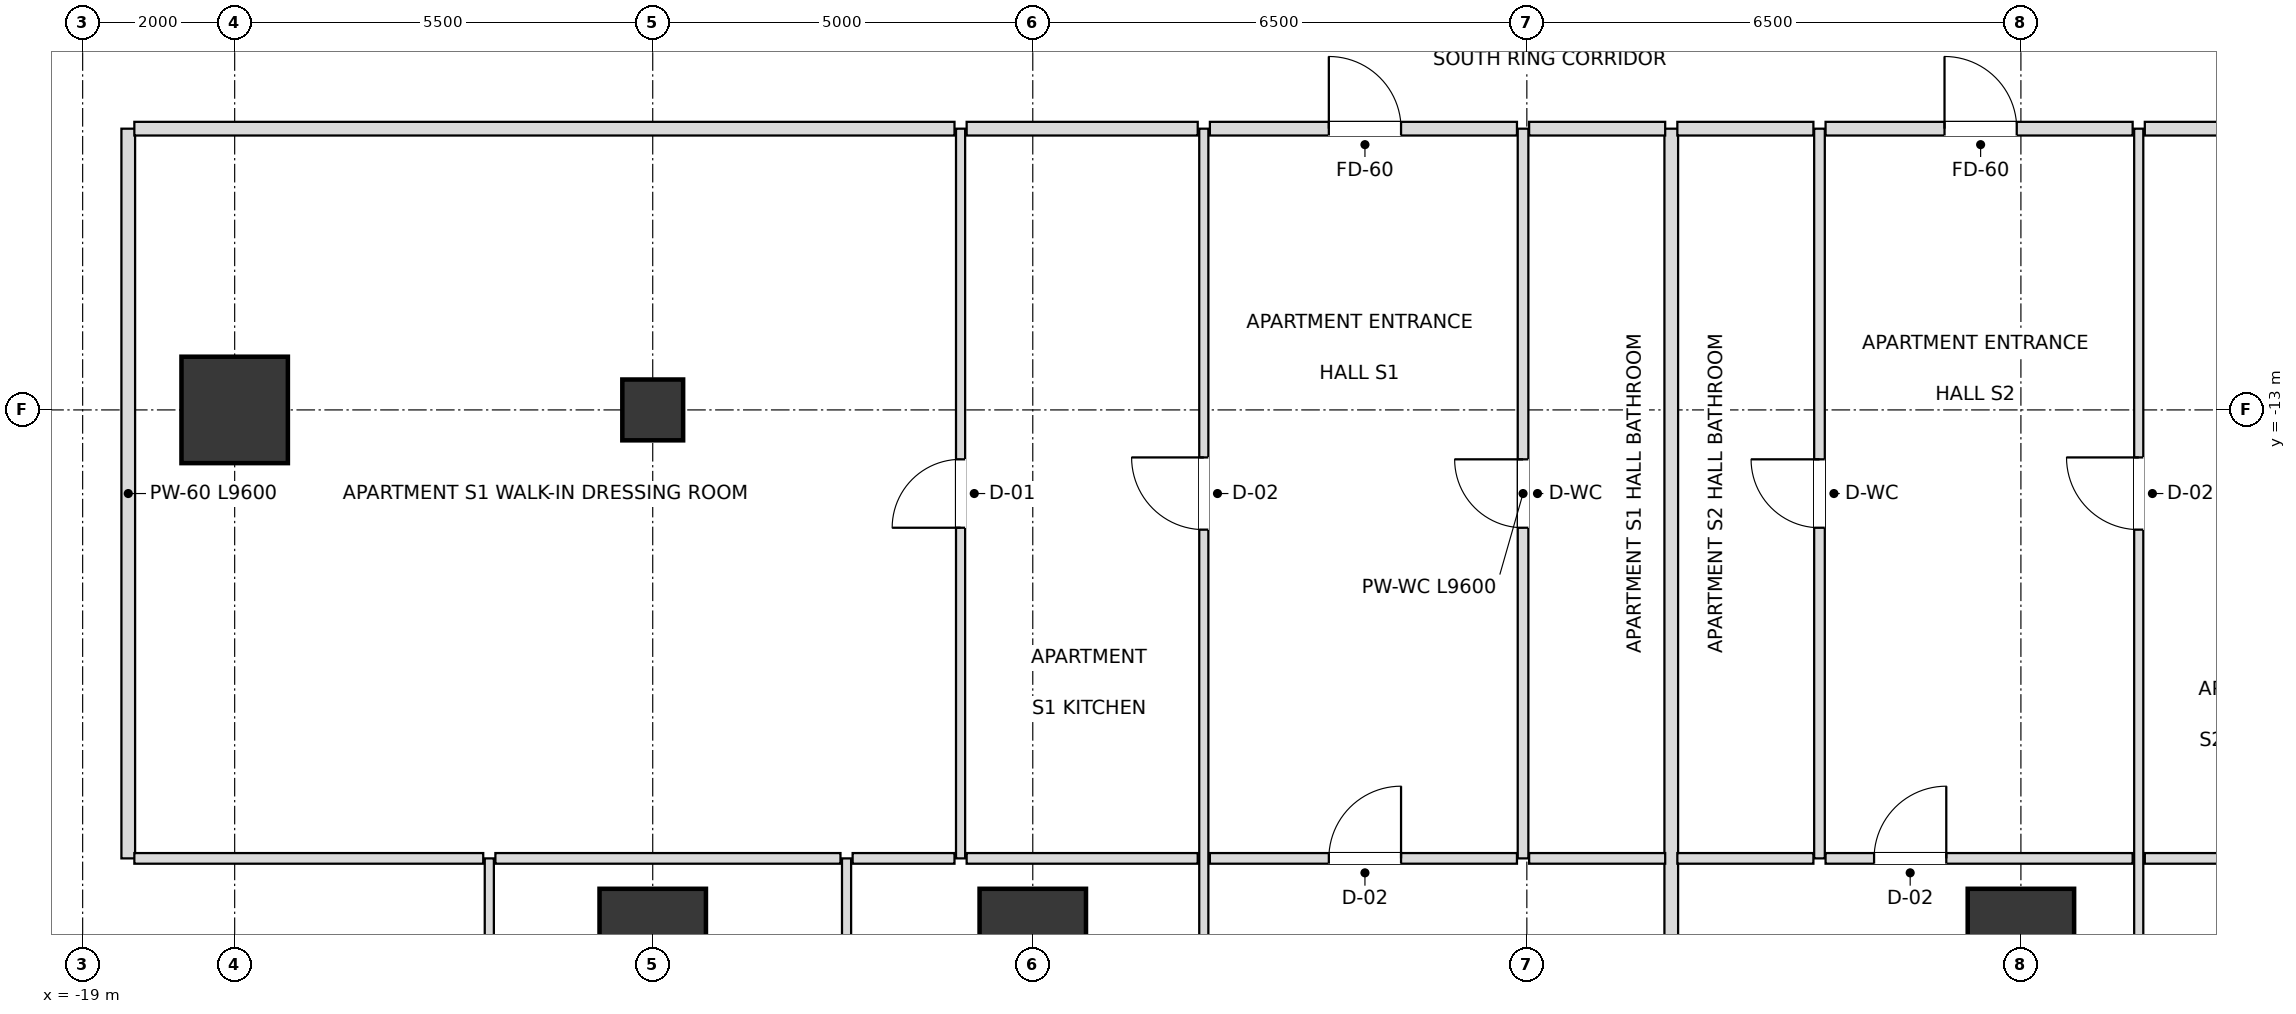
"""IFC4 building model, lengths in metres.
Left out: names, types, materials, properties, quantities, classifications, styles, units other than length and angle.
Written with IfcOpenShell. Run it as: python <this file> out.ifc"""

import sys

from ifc_helpers import new_model, si_unit, direction, frame, frame_2d, origin, origin_2d, place, context, subcontext, project, spatial, rectangle, extrude, element, fill, save


model = new_model("IFC4")
c1 = context("Model", 3, precision=1e-05, world=origin(), true_north=direction((0.0, 1.0)))
c2 = subcontext(c1, "Body", "Model", "MODEL_VIEW")
j1 = project(units=[si_unit("LENGTHUNIT", "METRE"), si_unit("PLANEANGLEUNIT", "RADIAN")], contexts=[c1])
p1 = place(None, origin())
s1 = spatial("IfcSite", under=j1, at=p1, CompositionType="ELEMENT")
p2 = place(p1, origin())
s2 = spatial("IfcBuilding", under=s1, at=p2, CompositionType="ELEMENT")
p3 = place(p2, frame((0.0, 0.0, 36.0)))
s3 = spatial("IfcBuildingStorey", under=s2, at=p3, CompositionType="ELEMENT", Elevation=36.0)
for number, where, z_axis, x_axis in (
    (1, (-11.5, -20.0, 0.0), (0.0, 0.0, 1.0), (1.0, 0.0, 0.0)),
    (2, (-6.5, -20.0, 0.0), (0.0, 0.0, 1.0), (1.0, 0.0, 0.0)),
    (3, (6.5, -20.0, 0.0), (0.0, 0.0, 1.0), (1.0, 0.0, 0.0)),
    (4, (-17.0, -13.0, 0.0), (0.0, 0.0, 1.0), (1.0, 0.0, 0.0)),
):
    element("IfcColumn", number, at=place(p3, frame(where, z_axis=z_axis, x_axis=x_axis)), inside=s3, PredefinedType="USERDEFINED", context=c2, shape_type="SweptSolid", body=[
        extrude(rectangle(XDim=1.4, YDim=1.4, at=origin_2d()), origin(), (0.0, 0.0, 1.0), 3.6),
    ])
p4 = place(p3, frame((-11.5, -13.0, 0.0), z_axis=(0.0, 0.0, 1.0), x_axis=(1.0, 0.0, 0.0)))
e5 = element("IfcColumn", 5, at=p4, inside=s3, PredefinedType="COLUMN", context=c2, shape_type="SweptSolid", body=[
    extrude(rectangle(XDim=0.8, YDim=0.8, at=origin_2d()), origin(), (0.0, 0.0, 1.0), 3.6),
])
p5 = place(p3, frame((-18.4, -18.9, 0.0), z_axis=(0.0, 0.0, 1.0), x_axis=(0.0, 1.0, 0.0)))
e6 = element("IfcWall", 6, at=p5, inside=s3, PredefinedType="PARTITIONING", context=c2, shape_type="SweptSolid", body=[
    extrude(rectangle(XDim=9.6, YDim=0.18, at=frame_2d((4.8, 0.0))), origin(), (0.0, 0.0, 1.0), 2.736),
])
p6 = place(p3, frame((-13.65, -24.9, 0.0), z_axis=(0.0, 0.0, 1.0), x_axis=(0.0, 1.0, 0.0)))
e7 = element("IfcWall", 7, at=p6, inside=s3, PredefinedType="PARTITIONING", context=c2, shape_type="SweptSolid", body=[
    extrude(rectangle(XDim=6.0, YDim=0.12, at=frame_2d((3.0, 0.0))), origin(), (0.0, 0.0, 1.0), 2.736),
])
p7 = place(p6, frame((2.55, 0.0, 0.0)))
e8 = element("IfcOpeningElement", 8, at=p7, cuts=e7, PredefinedType="OPENING", context=c2, shape_type="SweptSolid", body=[
    extrude(rectangle(XDim=0.9, YDim=2.1, at=frame_2d((0.45, 1.05))), frame((0.0, 0.07, 0.0), z_axis=(0.0, -1.0, 0.0), x_axis=(1.0, 0.0, 0.0)), (0.0, 0.0, 1.0), 0.14),
])
p8 = place(p3, frame((-8.95, -24.9, 0.0), z_axis=(0.0, 0.0, 1.0), x_axis=(0.0, 1.0, 0.0)))
e9 = element("IfcWall", 9, at=p8, inside=s3, PredefinedType="PARTITIONING", context=c2, shape_type="SweptSolid", body=[
    extrude(rectangle(XDim=6.0, YDim=0.12, at=frame_2d((3.0, 0.0))), origin(), (0.0, 0.0, 1.0), 2.816),
])
p9 = place(p8, frame((2.55, 0.0, 0.0)))
e10 = element("IfcOpeningElement", 10, at=p9, cuts=e9, PredefinedType="OPENING", context=c2, shape_type="SweptSolid", body=[
    extrude(rectangle(XDim=0.9, YDim=2.1, at=frame_2d((0.45, 1.05))), frame((0.0, 0.07, 0.0), z_axis=(0.0, -1.0, 0.0), x_axis=(1.0, 0.0, 0.0)), (0.0, 0.0, 1.0), 0.14),
])
p10 = place(p3, frame((-7.45, -18.9, 0.0), z_axis=(0.0, 0.0, 1.0), x_axis=(0.0, 1.0, 0.0)))
e11 = element("IfcWall", 11, at=p10, inside=s3, PredefinedType="PARTITIONING", context=c2, shape_type="SweptSolid", body=[
    extrude(rectangle(XDim=9.6, YDim=0.12, at=frame_2d((4.8, 0.0))), origin(), (0.0, 0.0, 1.0), 2.816),
])
p11 = place(p10, frame((4.35, 0.0, 0.0)))
e12 = element("IfcOpeningElement", 12, at=p11, cuts=e11, PredefinedType="OPENING", context=c2, shape_type="SweptSolid", body=[
    extrude(rectangle(XDim=0.9, YDim=2.1, at=frame_2d((0.45, 1.05))), frame((0.0, 0.07, 0.0), z_axis=(0.0, -1.0, 0.0), x_axis=(1.0, 0.0, 0.0)), (0.0, 0.0, 1.0), 0.14),
])
p12 = place(p3, frame((-4.25, -24.9, 0.0), z_axis=(0.0, 0.0, 1.0), x_axis=(0.0, 1.0, 0.0)))
e13 = element("IfcWall", 13, at=p12, inside=s3, PredefinedType="PARTITIONING", context=c2, shape_type="SweptSolid", body=[
    extrude(rectangle(XDim=15.6, YDim=0.12, at=frame_2d((7.8, 0.0))), origin(), (0.0, 0.0, 1.0), 2.816),
])
p13 = place(p12, frame((10.325, 0.0, 0.0)))
e14 = element("IfcOpeningElement", 14, at=p13, cuts=e13, PredefinedType="OPENING", context=c2, shape_type="SweptSolid", body=[
    extrude(rectangle(XDim=0.95, YDim=2.1, at=frame_2d((0.475, 1.05))), frame((0.0, 0.07, 0.0), z_axis=(0.0, -1.0, 0.0), x_axis=(1.0, 0.0, 0.0)), (0.0, 0.0, 1.0), 0.14),
])
p14 = place(p12, frame((2.55, 0.0, 0.0)))
e15 = element("IfcOpeningElement", 15, at=p14, cuts=e13, PredefinedType="OPENING", context=c2, shape_type="SweptSolid", body=[
    extrude(rectangle(XDim=0.9, YDim=2.1, at=frame_2d((0.45, 1.05))), frame((0.0, 0.07, 0.0), z_axis=(0.0, -1.0, 0.0), x_axis=(1.0, 0.0, 0.0)), (0.0, 0.0, 1.0), 0.14),
])
p15 = place(p3, frame((-0.05, -18.9, 0.0), z_axis=(0.0, 0.0, 1.0), x_axis=(0.0, 1.0, 0.0)))
e16 = element("IfcWall", 16, at=p15, inside=s3, PredefinedType="PARTITIONING", context=c2, shape_type="SweptSolid", body=[
    extrude(rectangle(XDim=9.6, YDim=0.14, at=frame_2d((4.8, 0.0))), origin(), (0.0, 0.0, 1.0), 2.948),
])
p16 = place(p15, frame((4.35, 0.0, 0.0)))
e17 = element("IfcOpeningElement", 17, at=p16, cuts=e16, PredefinedType="OPENING", context=c2, shape_type="SweptSolid", body=[
    extrude(rectangle(XDim=0.9, YDim=2.1, at=frame_2d((0.45, 1.05))), frame((0.0, 0.08, 0.0), z_axis=(0.0, -1.0, 0.0), x_axis=(1.0, 0.0, 0.0)), (0.0, 0.0, 1.0), 0.16),
])
p17 = place(p3, frame((1.9, -24.9, 0.0), z_axis=(0.0, 0.0, 1.0), x_axis=(0.0, 1.0, 0.0)))
e18 = element("IfcWall", 18, at=p17, inside=s3, PredefinedType="PARTITIONING", context=c2, shape_type="SweptSolid", body=[
    extrude(rectangle(XDim=15.6, YDim=0.18, at=frame_2d((7.8, 0.0))), origin(), (0.0, 0.0, 1.0), 2.816),
])
p18 = place(p3, frame((3.85, -18.9, 0.0), z_axis=(0.0, 0.0, 1.0), x_axis=(0.0, 1.0, 0.0)))
e19 = element("IfcWall", 19, at=p18, inside=s3, PredefinedType="PARTITIONING", context=c2, shape_type="SweptSolid", body=[
    extrude(rectangle(XDim=9.6, YDim=0.14, at=frame_2d((4.8, 0.0))), origin(), (0.0, 0.0, 1.0), 2.948),
])
p19 = place(p18, frame((4.35, 0.0, 0.0)))
e20 = element("IfcOpeningElement", 20, at=p19, cuts=e19, PredefinedType="OPENING", context=c2, shape_type="SweptSolid", body=[
    extrude(rectangle(XDim=0.9, YDim=2.1, at=frame_2d((0.45, 1.05))), frame((0.0, 0.08, 0.0), z_axis=(0.0, -1.0, 0.0), x_axis=(1.0, 0.0, 0.0)), (0.0, 0.0, 1.0), 0.16),
])
p20 = place(p3, frame((8.05, -24.9, 0.0), z_axis=(0.0, 0.0, 1.0), x_axis=(0.0, 1.0, 0.0)))
e21 = element("IfcWall", 21, at=p20, inside=s3, PredefinedType="PARTITIONING", context=c2, shape_type="SweptSolid", body=[
    extrude(rectangle(XDim=15.6, YDim=0.12, at=frame_2d((7.8, 0.0))), origin(), (0.0, 0.0, 1.0), 2.816),
])
p21 = place(p20, frame((10.325, 0.0, 0.0)))
e22 = element("IfcOpeningElement", 22, at=p21, cuts=e21, PredefinedType="OPENING", context=c2, shape_type="SweptSolid", body=[
    extrude(rectangle(XDim=0.95, YDim=2.1, at=frame_2d((0.475, 1.05))), frame((0.0, 0.07, 0.0), z_axis=(0.0, -1.0, 0.0), x_axis=(1.0, 0.0, 0.0)), (0.0, 0.0, 1.0), 0.14),
])
p22 = place(p20, frame((2.55, 0.0, 0.0)))
e23 = element("IfcOpeningElement", 23, at=p22, cuts=e21, PredefinedType="OPENING", context=c2, shape_type="SweptSolid", body=[
    extrude(rectangle(XDim=0.9, YDim=2.1, at=frame_2d((0.45, 1.05))), frame((0.0, 0.07, 0.0), z_axis=(0.0, -1.0, 0.0), x_axis=(1.0, 0.0, 0.0)), (0.0, 0.0, 1.0), 0.14),
])
p23 = place(p3, frame((-18.32, -18.9, 0.0), z_axis=(0.0, 0.0, 1.0), x_axis=(1.0, 0.0, 0.0)))
e24 = element("IfcWall", 24, at=p23, inside=s3, PredefinedType="PARTITIONING", context=c2, shape_type="SweptSolid", body=[
    extrude(rectangle(XDim=4.59, YDim=0.14, at=frame_2d((2.295, 0.0))), origin(), (0.0, 0.0, 1.0), 2.736),
])
p24 = place(p3, frame((-13.57, -18.9, 0.0), z_axis=(0.0, 0.0, 1.0), x_axis=(1.0, 0.0, 0.0)))
e25 = element("IfcWall", 25, at=p24, inside=s3, PredefinedType="PARTITIONING", context=c2, shape_type="SweptSolid", body=[
    extrude(rectangle(XDim=4.54, YDim=0.14, at=frame_2d((2.27, 0.0))), origin(), (0.0, 0.0, 1.0), 2.736),
])
p25 = place(p3, frame((-8.87, -18.9, 0.0), z_axis=(0.0, 0.0, 1.0), x_axis=(1.0, 0.0, 0.0)))
e26 = element("IfcWall", 26, at=p25, inside=s3, PredefinedType="PARTITIONING", context=c2, shape_type="SweptSolid", body=[
    extrude(rectangle(XDim=1.34, YDim=0.14, at=frame_2d((0.67, 0.0))), origin(), (0.0, 0.0, 1.0), 3.38),
])
p26 = place(p3, frame((-7.37, -18.9, 0.0), z_axis=(0.0, 0.0, 1.0), x_axis=(1.0, 0.0, 0.0)))
e27 = element("IfcWall", 27, at=p26, inside=s3, PredefinedType="PARTITIONING", context=c2, shape_type="SweptSolid", body=[
    extrude(rectangle(XDim=3.04, YDim=0.14, at=frame_2d((1.52, 0.0))), origin(), (0.0, 0.0, 1.0), 2.816),
])
p27 = place(p3, frame((-4.17, -18.9, 0.0), z_axis=(0.0, 0.0, 1.0), x_axis=(1.0, 0.0, 0.0)))
e28 = element("IfcWall", 28, at=p27, inside=s3, PredefinedType="PARTITIONING", context=c2, shape_type="SweptSolid", body=[
    extrude(rectangle(XDim=4.04, YDim=0.14, at=frame_2d((2.02, 0.0))), origin(), (0.0, 0.0, 1.0), 3.38),
])
p28 = place(p27, frame((1.565, 0.0, 0.0)))
e29 = element("IfcOpeningElement", 29, at=p28, cuts=e28, PredefinedType="OPENING", context=c2, shape_type="SweptSolid", body=[
    extrude(rectangle(XDim=0.95, YDim=2.1, at=frame_2d((0.475, 1.05))), frame((0.0, 0.08, 0.0), z_axis=(0.0, -1.0, 0.0), x_axis=(1.0, 0.0, 0.0)), (0.0, 0.0, 1.0), 0.16),
])
for number, where, z_axis, x_axis in (
    (30, (0.03, -18.9, 0.0), (0.0, 0.0, 1.0), (1.0, 0.0, 0.0)),
    (31, (1.98, -18.9, 0.0), (0.0, 0.0, 1.0), (1.0, 0.0, 0.0)),
):
    element("IfcWall", number, at=place(p3, frame(where, z_axis=z_axis, x_axis=x_axis)), inside=s3, PredefinedType="PARTITIONING", context=c2, shape_type="SweptSolid", body=[
        extrude(rectangle(XDim=1.79, YDim=0.14, at=frame_2d((0.895, 0.0))), origin(), (0.0, 0.0, 1.0), 3.38),
    ])
p29 = place(p3, frame((3.93, -18.9, 0.0), z_axis=(0.0, 0.0, 1.0), x_axis=(1.0, 0.0, 0.0)))
e32 = element("IfcWall", 32, at=p29, inside=s3, PredefinedType="PARTITIONING", context=c2, shape_type="SweptSolid", body=[
    extrude(rectangle(XDim=4.04, YDim=0.14, at=frame_2d((2.02, 0.0))), origin(), (0.0, 0.0, 1.0), 2.816),
])
p30 = place(p29, frame((0.638, 0.0, 0.0)))
e33 = element("IfcOpeningElement", 33, at=p30, cuts=e32, PredefinedType="OPENING", context=c2, shape_type="SweptSolid", body=[
    extrude(rectangle(XDim=0.95, YDim=2.1, at=frame_2d((0.475, 1.05))), frame((0.0, 0.08, 0.0), z_axis=(0.0, -1.0, 0.0), x_axis=(1.0, 0.0, 0.0)), (0.0, 0.0, 1.0), 0.16),
])
p31 = place(p3, frame((8.13, -18.9, 0.0), z_axis=(0.0, 0.0, 1.0), x_axis=(1.0, 0.0, 0.0)))
e34 = element("IfcWall", 34, at=p31, inside=s3, PredefinedType="PARTITIONING", context=c2, shape_type="SweptSolid", body=[
    extrude(rectangle(XDim=3.04, YDim=0.14, at=frame_2d((1.52, 0.0))), origin(), (0.0, 0.0, 1.0), 3.38),
])
p32 = place(p3, frame((-18.32, -9.3, 0.0), z_axis=(0.0, 0.0, 1.0), x_axis=(1.0, 0.0, 0.0)))
e35 = element("IfcWall", 35, at=p32, inside=s3, PredefinedType="PARTITIONING", context=c2, shape_type="SweptSolid", body=[
    extrude(rectangle(XDim=10.79, YDim=0.18, at=frame_2d((5.395, 0.0))), origin(), (0.0, 0.0, 1.0), 2.816),
])
p33 = place(p3, frame((-7.37, -9.3, 0.0), z_axis=(0.0, 0.0, 1.0), x_axis=(1.0, 0.0, 0.0)))
e36 = element("IfcWall", 36, at=p33, inside=s3, PredefinedType="PARTITIONING", context=c2, shape_type="SweptSolid", body=[
    extrude(rectangle(XDim=3.04, YDim=0.18, at=frame_2d((1.52, 0.0))), origin(), (0.0, 0.0, 1.0), 2.816),
])
p34 = place(p3, frame((-4.17, -9.3, 0.0), z_axis=(0.0, 0.0, 1.0), x_axis=(1.0, 0.0, 0.0)))
e37 = element("IfcWall", 37, at=p34, inside=s3, PredefinedType="PARTITIONING", context=c2, shape_type="SweptSolid", body=[
    extrude(rectangle(XDim=4.04, YDim=0.18, at=frame_2d((2.02, 0.0))), origin(), (0.0, 0.0, 1.0), 3.38),
])
p35 = place(p34, frame((1.565, 0.0, 0.0)))
e38 = element("IfcOpeningElement", 38, at=p35, cuts=e37, PredefinedType="OPENING", context=c2, shape_type="SweptSolid", body=[
    extrude(rectangle(XDim=0.95, YDim=2.15, at=frame_2d((0.475, 1.075))), frame((0.0, 0.1, 0.0), z_axis=(0.0, -1.0, 0.0), x_axis=(1.0, 0.0, 0.0)), (0.0, 0.0, 1.0), 0.2),
])
for number, where, z_axis, x_axis in (
    (39, (0.03, -9.3, 0.0), (0.0, 0.0, 1.0), (1.0, 0.0, 0.0)),
    (40, (1.98, -9.3, 0.0), (0.0, 0.0, 1.0), (1.0, 0.0, 0.0)),
):
    element("IfcWall", number, at=place(p3, frame(where, z_axis=z_axis, x_axis=x_axis)), inside=s3, PredefinedType="PARTITIONING", context=c2, shape_type="SweptSolid", body=[
        extrude(rectangle(XDim=1.79, YDim=0.18, at=frame_2d((0.895, 0.0))), origin(), (0.0, 0.0, 1.0), 3.38),
    ])
p36 = place(p3, frame((3.93, -9.3, 0.0), z_axis=(0.0, 0.0, 1.0), x_axis=(1.0, 0.0, 0.0)))
e41 = element("IfcWall", 41, at=p36, inside=s3, PredefinedType="PARTITIONING", context=c2, shape_type="SweptSolid", body=[
    extrude(rectangle(XDim=4.04, YDim=0.18, at=frame_2d((2.02, 0.0))), origin(), (0.0, 0.0, 1.0), 2.816),
])
p37 = place(p36, frame((1.565, 0.0, 0.0)))
e42 = element("IfcOpeningElement", 42, at=p37, cuts=e41, PredefinedType="OPENING", context=c2, shape_type="SweptSolid", body=[
    extrude(rectangle(XDim=0.95, YDim=2.15, at=frame_2d((0.475, 1.075))), frame((0.0, 0.1, 0.0), z_axis=(0.0, -1.0, 0.0), x_axis=(1.0, 0.0, 0.0)), (0.0, 0.0, 1.0), 0.2),
])
p38 = place(p3, frame((8.13, -9.3, 0.0), z_axis=(0.0, 0.0, 1.0), x_axis=(1.0, 0.0, 0.0)))
e43 = element("IfcWall", 43, at=p38, inside=s3, PredefinedType="PARTITIONING", context=c2, shape_type="SweptSolid", body=[
    extrude(rectangle(XDim=3.04, YDim=0.18, at=frame_2d((1.52, 0.0))), origin(), (0.0, 0.0, 1.0), 3.38),
])
p39 = place(p16, origin())
e44 = element("IfcDoor", 44, at=p39, inside=s3, OperationType="SINGLE_SWING_RIGHT", PredefinedType="DOOR", context=c2, shape_type="SweptSolid", body=[
    extrude(rectangle(XDim=0.9, YDim=2.1, at=frame_2d((0.45, 1.05))), frame((0.0, 0.025, 0.0), z_axis=(0.0, -1.0, 0.0), x_axis=(1.0, 0.0, 0.0)), (0.0, 0.0, 1.0), 0.05),
])
fill(e17, e44)
p40 = place(p35, origin())
e45 = element("IfcDoor", 45, at=p40, inside=s3, OperationType="SINGLE_SWING_LEFT", PredefinedType="DOOR", context=c2, shape_type="SweptSolid", body=[
    extrude(rectangle(XDim=0.95, YDim=2.15, at=frame_2d((0.475, 1.075))), frame((0.0, 0.025, 0.0), z_axis=(0.0, -1.0, 0.0), x_axis=(1.0, 0.0, 0.0)), (0.0, 0.0, 1.0), 0.05),
])
fill(e38, e45)
p41 = place(p13, origin())
e46 = element("IfcDoor", 46, at=p41, inside=s3, OperationType="SINGLE_SWING_RIGHT", PredefinedType="DOOR", context=c2, shape_type="SweptSolid", body=[
    extrude(rectangle(XDim=0.95, YDim=2.1, at=frame_2d((0.475, 1.05))), frame((0.0, 0.025, 0.0), z_axis=(0.0, -1.0, 0.0), x_axis=(1.0, 0.0, 0.0)), (0.0, 0.0, 1.0), 0.05),
])
fill(e14, e46)
p42 = place(p11, origin())
e47 = element("IfcDoor", 47, at=p42, inside=s3, OperationType="SINGLE_SWING_LEFT", PredefinedType="DOOR", context=c2, shape_type="SweptSolid", body=[
    extrude(rectangle(XDim=0.9, YDim=2.1, at=frame_2d((0.45, 1.05))), frame((0.0, 0.025, 0.0), z_axis=(0.0, -1.0, 0.0), x_axis=(1.0, 0.0, 0.0)), (0.0, 0.0, 1.0), 0.05),
])
fill(e12, e47)
p43 = place(p28, origin())
e48 = element("IfcDoor", 48, at=p43, inside=s3, OperationType="SINGLE_SWING_RIGHT", PredefinedType="DOOR", context=c2, shape_type="SweptSolid", body=[
    extrude(rectangle(XDim=0.95, YDim=2.1, at=frame_2d((0.475, 1.05))), frame((0.0, 0.025, 0.0), z_axis=(0.0, -1.0, 0.0), x_axis=(1.0, 0.0, 0.0)), (0.0, 0.0, 1.0), 0.05),
])
fill(e29, e48)
p44 = place(p19, origin())
e49 = element("IfcDoor", 49, at=p44, inside=s3, OperationType="SINGLE_SWING_RIGHT", PredefinedType="DOOR", context=c2, shape_type="SweptSolid", body=[
    extrude(rectangle(XDim=0.9, YDim=2.1, at=frame_2d((0.45, 1.05))), frame((0.0, 0.025, 0.0), z_axis=(0.0, -1.0, 0.0), x_axis=(1.0, 0.0, 0.0)), (0.0, 0.0, 1.0), 0.05),
])
fill(e20, e49)
p45 = place(p37, origin())
e50 = element("IfcDoor", 50, at=p45, inside=s3, OperationType="SINGLE_SWING_LEFT", PredefinedType="DOOR", context=c2, shape_type="SweptSolid", body=[
    extrude(rectangle(XDim=0.95, YDim=2.15, at=frame_2d((0.475, 1.075))), frame((0.0, 0.025, 0.0), z_axis=(0.0, -1.0, 0.0), x_axis=(1.0, 0.0, 0.0)), (0.0, 0.0, 1.0), 0.05),
])
fill(e42, e50)
p46 = place(p21, origin())
e51 = element("IfcDoor", 51, at=p46, inside=s3, OperationType="SINGLE_SWING_RIGHT", PredefinedType="DOOR", context=c2, shape_type="SweptSolid", body=[
    extrude(rectangle(XDim=0.95, YDim=2.1, at=frame_2d((0.475, 1.05))), frame((0.0, 0.025, 0.0), z_axis=(0.0, -1.0, 0.0), x_axis=(1.0, 0.0, 0.0)), (0.0, 0.0, 1.0), 0.05),
])
fill(e22, e51)
p47 = place(p30, origin())
e52 = element("IfcDoor", 52, at=p47, inside=s3, OperationType="SINGLE_SWING_RIGHT", PredefinedType="DOOR", context=c2, shape_type="SweptSolid", body=[
    extrude(rectangle(XDim=0.95, YDim=2.1, at=frame_2d((0.475, 1.05))), frame((0.0, 0.025, 0.0), z_axis=(0.0, -1.0, 0.0), x_axis=(1.0, 0.0, 0.0)), (0.0, 0.0, 1.0), 0.05),
])
fill(e33, e52)
save(model, sys.argv[1])
